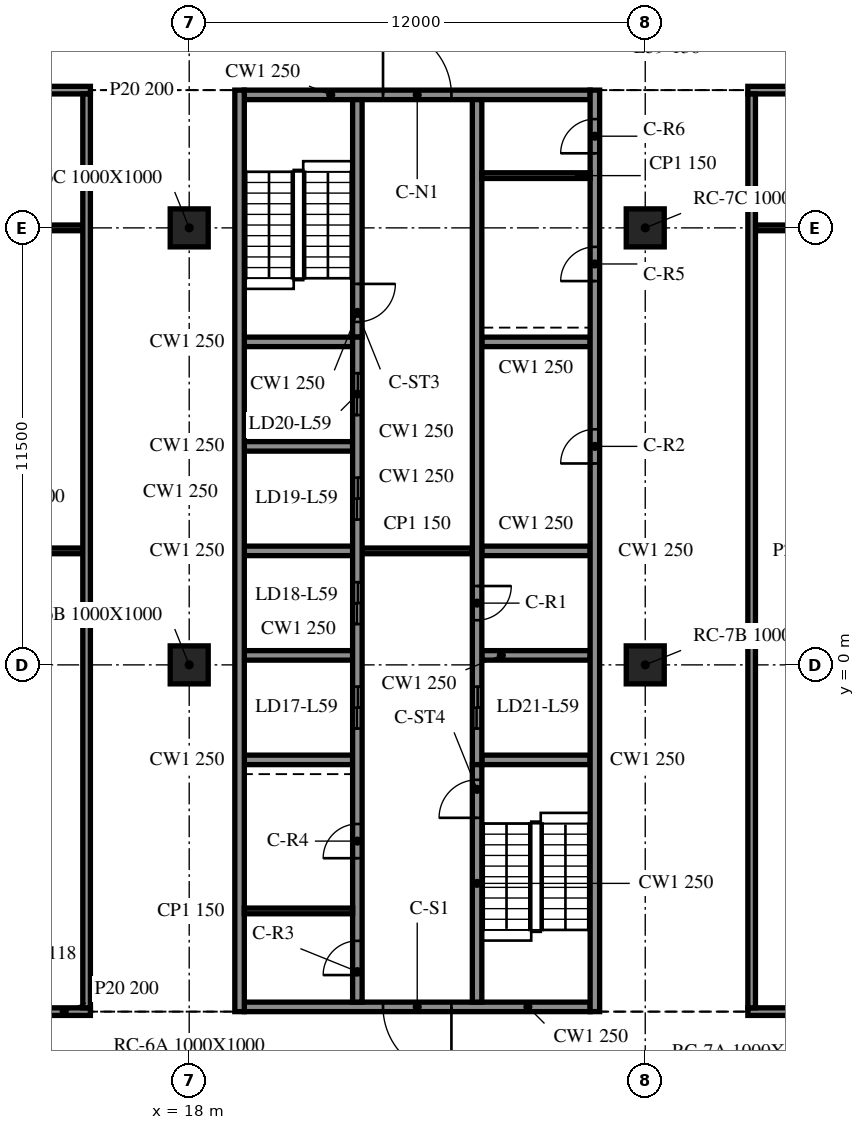
"""IFC4 building model, lengths in metres.
Left out: names, types, materials, properties, quantities, classifications, styles, units other than length and angle.
Written with IfcOpenShell. Run it as: python <this file> out.ifc"""

import sys

from ifc_helpers import new_model, si_unit, direction, frame, frame_2d, origin, origin_2d, place, context, subcontext, project, spatial, rectangle, extrude, element, fill, save


model = new_model("IFC4")
c1 = context("Model", 3, precision=1e-05, world=origin(), true_north=direction((0.0, 1.0)))
c2 = subcontext(c1, "Body", "Model", "MODEL_VIEW")
j1 = project(units=[si_unit("LENGTHUNIT", "METRE"), si_unit("PLANEANGLEUNIT", "RADIAN")], contexts=[c1])
p1 = place(None, origin())
s1 = spatial("IfcSite", under=j1, at=p1, CompositionType="ELEMENT")
p2 = place(p1, origin())
s2 = spatial("IfcBuilding", under=s1, at=p2, CompositionType="ELEMENT")
p3 = place(p2, frame((0.0, 0.0, 243.8)))
s3 = spatial("IfcBuildingStorey", under=s2, at=p3, CompositionType="ELEMENT", Elevation=243.8)
for number, where, z_axis, x_axis in (
    (1, (18.0, 0.0, -0.34), (0.0, 0.0, 1.0), (1.0, 0.0, 0.0)),
    (2, (18.0, 11.5, -0.34), (0.0, 0.0, 1.0), (1.0, 0.0, 0.0)),
    (3, (30.0, 0.0, -0.34), (0.0, 0.0, 1.0), (1.0, 0.0, 0.0)),
    (4, (30.0, 11.5, -0.34), (0.0, 0.0, 1.0), (1.0, 0.0, 0.0)),
):
    element("IfcColumn", number, at=place(p3, frame(where, z_axis=z_axis, x_axis=x_axis)), inside=s3, PredefinedType="COLUMN", context=c2, shape_type="SweptSolid", body=[
        extrude(rectangle(XDim=1.0, YDim=1.0, at=origin_2d()), origin(), (0.0, 0.0, 1.0), 3.8),
    ])
p4 = place(p3, frame((19.325, 15.125, 0.0), z_axis=(0.0, 0.0, 1.0), x_axis=(0.0, -1.0, 0.0)))
e5 = element("IfcWall", 5, at=p4, inside=s3, PredefinedType="SOLIDWALL", context=c2, shape_type="SweptSolid", body=[
    extrude(rectangle(XDim=24.25, YDim=0.25, at=frame_2d((12.125, 0.0))), origin(), (0.0, 0.0, 1.0), 3.46),
])
p5 = place(p3, frame((28.675, -9.125, 0.0), z_axis=(0.0, 0.0, 1.0), x_axis=(0.0, 1.0, 0.0)))
e6 = element("IfcWall", 6, at=p5, inside=s3, PredefinedType="SOLIDWALL", context=c2, shape_type="SweptSolid", body=[
    extrude(rectangle(XDim=24.25, YDim=0.25, at=frame_2d((12.125, 0.0))), origin(), (0.0, 0.0, 1.0), 3.46),
])
p6 = place(p5, frame((14.425, 0.0, 0.0)))
e7 = element("IfcOpeningElement", 7, at=p6, cuts=e6, PredefinedType="OPENING", context=c2, shape_type="SweptSolid", body=[
    extrude(rectangle(XDim=0.9, YDim=2.1, at=frame_2d((0.45, 1.05))), frame((0.0, 0.135, 0.0), z_axis=(0.0, -1.0, 0.0), x_axis=(1.0, 0.0, 0.0)), (0.0, 0.0, 1.0), 0.27),
])
p7 = place(p5, frame((19.225, 0.0, 0.0)))
e8 = element("IfcOpeningElement", 8, at=p7, cuts=e6, PredefinedType="OPENING", context=c2, shape_type="SweptSolid", body=[
    extrude(rectangle(XDim=0.9, YDim=2.1, at=frame_2d((0.45, 1.05))), frame((0.0, 0.135, 0.0), z_axis=(0.0, -1.0, 0.0), x_axis=(1.0, 0.0, 0.0)), (0.0, 0.0, 1.0), 0.27),
])
p8 = place(p5, frame((22.587, 0.0, 0.0)))
e9 = element("IfcOpeningElement", 9, at=p8, cuts=e6, PredefinedType="OPENING", context=c2, shape_type="SweptSolid", body=[
    extrude(rectangle(XDim=0.9, YDim=2.1, at=frame_2d((0.45, 1.05))), frame((0.0, 0.135, 0.0), z_axis=(0.0, -1.0, 0.0), x_axis=(1.0, 0.0, 0.0)), (0.0, 0.0, 1.0), 0.27),
])
p9 = place(p3, frame((28.55, -9.0, 0.0), z_axis=(0.0, 0.0, 1.0), x_axis=(-1.0, 0.0, 0.0)))
e10 = element("IfcWall", 10, at=p9, inside=s3, PredefinedType="SOLIDWALL", context=c2, shape_type="SweptSolid", body=[
    extrude(rectangle(XDim=9.1, YDim=0.25, at=frame_2d((4.55, 0.0))), origin(), (0.0, 0.0, 1.0), 3.46),
])
p10 = place(p9, frame((3.65, 0.0, 0.0)))
e11 = element("IfcOpeningElement", 11, at=p10, cuts=e10, PredefinedType="OPENING", context=c2, shape_type="SweptSolid", body=[
    extrude(rectangle(XDim=1.8, YDim=2.1, at=frame_2d((0.9, 1.05))), frame((0.0, 0.135, 0.0), z_axis=(0.0, -1.0, 0.0), x_axis=(1.0, 0.0, 0.0)), (0.0, 0.0, 1.0), 0.27),
])
p11 = place(p3, frame((19.45, 15.0, 0.0), z_axis=(0.0, 0.0, 1.0), x_axis=(1.0, 0.0, 0.0)))
e12 = element("IfcWall", 12, at=p11, inside=s3, PredefinedType="SOLIDWALL", context=c2, shape_type="SweptSolid", body=[
    extrude(rectangle(XDim=9.1, YDim=0.25, at=frame_2d((4.55, 0.0))), origin(), (0.0, 0.0, 1.0), 3.46),
])
p12 = place(p11, frame((3.65, 0.0, 0.0)))
e13 = element("IfcOpeningElement", 13, at=p12, cuts=e12, PredefinedType="OPENING", context=c2, shape_type="SweptSolid", body=[
    extrude(rectangle(XDim=1.8, YDim=2.1, at=frame_2d((0.9, 1.05))), frame((0.0, 0.135, 0.0), z_axis=(0.0, -1.0, 0.0), x_axis=(1.0, 0.0, 0.0)), (0.0, 0.0, 1.0), 0.27),
])
p13 = place(p3, frame((22.425, -8.875, 0.0), z_axis=(0.0, 0.0, 1.0), x_axis=(0.0, 1.0, 0.0)))
e14 = element("IfcWall", 14, at=p13, inside=s3, PredefinedType="SOLIDWALL", context=c2, shape_type="SweptSolid", body=[
    extrude(rectangle(XDim=17.5, YDim=0.25, at=frame_2d((8.75, 0.0))), origin(), (0.0, 0.0, 1.0), 3.46),
])
p14 = place(p13, frame((7.2, 0.0, 0.0)))
e15 = element("IfcOpeningElement", 15, at=p14, cuts=e14, PredefinedType="OPENING", context=c2, shape_type="SweptSolid", body=[
    extrude(rectangle(XDim=1.1, YDim=2.1, at=frame_2d((0.55, 1.05))), frame((0.0, 0.135, 0.0), z_axis=(0.0, -1.0, 0.0), x_axis=(1.0, 0.0, 0.0)), (0.0, 0.0, 1.0), 0.27),
])
p15 = place(p13, frame((9.95, 0.0, 0.0)))
e16 = element("IfcOpeningElement", 16, at=p15, cuts=e14, PredefinedType="OPENING", context=c2, shape_type="SweptSolid", body=[
    extrude(rectangle(XDim=1.1, YDim=2.1, at=frame_2d((0.55, 1.05))), frame((0.0, 0.135, 0.0), z_axis=(0.0, -1.0, 0.0), x_axis=(1.0, 0.0, 0.0)), (0.0, 0.0, 1.0), 0.27),
])
p16 = place(p13, frame((12.7, 0.0, 0.0)))
e17 = element("IfcOpeningElement", 17, at=p16, cuts=e14, PredefinedType="OPENING", context=c2, shape_type="SweptSolid", body=[
    extrude(rectangle(XDim=1.1, YDim=2.1, at=frame_2d((0.55, 1.05))), frame((0.0, 0.135, 0.0), z_axis=(0.0, -1.0, 0.0), x_axis=(1.0, 0.0, 0.0)), (0.0, 0.0, 1.0), 0.27),
])
p17 = place(p13, frame((15.45, 0.0, 0.0)))
e18 = element("IfcOpeningElement", 18, at=p17, cuts=e14, PredefinedType="OPENING", context=c2, shape_type="SweptSolid", body=[
    extrude(rectangle(XDim=1.1, YDim=2.1, at=frame_2d((0.55, 1.05))), frame((0.0, 0.135, 0.0), z_axis=(0.0, -1.0, 0.0), x_axis=(1.0, 0.0, 0.0)), (0.0, 0.0, 1.0), 0.27),
])
p18 = place(p13, frame((0.712, 0.0, 0.0)))
e19 = element("IfcOpeningElement", 19, at=p18, cuts=e14, PredefinedType="OPENING", context=c2, shape_type="SweptSolid", body=[
    extrude(rectangle(XDim=0.9, YDim=2.1, at=frame_2d((0.45, 1.05))), frame((0.0, 0.135, 0.0), z_axis=(0.0, -1.0, 0.0), x_axis=(1.0, 0.0, 0.0)), (0.0, 0.0, 1.0), 0.27),
])
p19 = place(p13, frame((3.788, 0.0, 0.0)))
e20 = element("IfcOpeningElement", 20, at=p19, cuts=e14, PredefinedType="OPENING", context=c2, shape_type="SweptSolid", body=[
    extrude(rectangle(XDim=0.9, YDim=2.1, at=frame_2d((0.45, 1.05))), frame((0.0, 0.135, 0.0), z_axis=(0.0, -1.0, 0.0), x_axis=(1.0, 0.0, 0.0)), (0.0, 0.0, 1.0), 0.27),
])
p20 = place(p3, frame((22.425, 14.875, 0.0), z_axis=(0.0, 0.0, 1.0), x_axis=(0.0, -1.0, 0.0)))
e21 = element("IfcWall", 21, at=p20, inside=s3, PredefinedType="SOLIDWALL", context=c2, shape_type="SweptSolid", body=[
    extrude(rectangle(XDim=6.25, YDim=0.25, at=frame_2d((3.125, 0.0))), origin(), (0.0, 0.0, 1.0), 3.46),
])
p21 = place(p20, frame((4.85, 0.0, 0.0)))
e22 = element("IfcOpeningElement", 22, at=p21, cuts=e21, PredefinedType="OPENING", context=c2, shape_type="SweptSolid", body=[
    extrude(rectangle(XDim=1.0, YDim=2.1, at=frame_2d((0.5, 1.05))), frame((0.0, 0.135, 0.0), z_axis=(0.0, -1.0, 0.0), x_axis=(1.0, 0.0, 0.0)), (0.0, 0.0, 1.0), 0.27),
])
p22 = place(p3, frame((25.575, -8.875, 0.0), z_axis=(0.0, 0.0, 1.0), x_axis=(0.0, 1.0, 0.0)))
e23 = element("IfcWall", 23, at=p22, inside=s3, PredefinedType="SOLIDWALL", context=c2, shape_type="SweptSolid", body=[
    extrude(rectangle(XDim=6.25, YDim=0.25, at=frame_2d((3.125, 0.0))), origin(), (0.0, 0.0, 1.0), 3.46),
])
p23 = place(p22, frame((4.85, 0.0, 0.0)))
e24 = element("IfcOpeningElement", 24, at=p23, cuts=e23, PredefinedType="OPENING", context=c2, shape_type="SweptSolid", body=[
    extrude(rectangle(XDim=1.0, YDim=2.1, at=frame_2d((0.5, 1.05))), frame((0.0, 0.135, 0.0), z_axis=(0.0, -1.0, 0.0), x_axis=(1.0, 0.0, 0.0)), (0.0, 0.0, 1.0), 0.27),
])
p24 = place(p3, frame((25.575, 14.875, 0.0), z_axis=(0.0, 0.0, 1.0), x_axis=(0.0, -1.0, 0.0)))
e25 = element("IfcWall", 25, at=p24, inside=s3, PredefinedType="SOLIDWALL", context=c2, shape_type="SweptSolid", body=[
    extrude(rectangle(XDim=17.5, YDim=0.25, at=frame_2d((8.75, 0.0))), origin(), (0.0, 0.0, 1.0), 3.46),
])
p25 = place(p24, frame((15.45, 0.0, 0.0)))
e26 = element("IfcOpeningElement", 26, at=p25, cuts=e25, PredefinedType="OPENING", context=c2, shape_type="SweptSolid", body=[
    extrude(rectangle(XDim=1.1, YDim=2.1, at=frame_2d((0.55, 1.05))), frame((0.0, 0.135, 0.0), z_axis=(0.0, -1.0, 0.0), x_axis=(1.0, 0.0, 0.0)), (0.0, 0.0, 1.0), 0.27),
])
p26 = place(p24, frame((12.8, 0.0, 0.0)))
e27 = element("IfcOpeningElement", 27, at=p26, cuts=e25, PredefinedType="OPENING", context=c2, shape_type="SweptSolid", body=[
    extrude(rectangle(XDim=0.9, YDim=2.1, at=frame_2d((0.45, 1.05))), frame((0.0, 0.135, 0.0), z_axis=(0.0, -1.0, 0.0), x_axis=(1.0, 0.0, 0.0)), (0.0, 0.0, 1.0), 0.27),
])
for number, where, z_axis, x_axis in (
    (28, (19.45, -2.5, 0.0), (0.0, 0.0, 1.0), (1.0, 0.0, 0.0)),
    (29, (19.45, 0.25, 0.0), (0.0, 0.0, 1.0), (1.0, 0.0, 0.0)),
    (30, (19.45, 3.0, 0.0), (0.0, 0.0, 1.0), (1.0, 0.0, 0.0)),
    (31, (19.45, 5.75, 0.0), (0.0, 0.0, 1.0), (1.0, 0.0, 0.0)),
    (32, (19.45, 8.5, 0.0), (0.0, 0.0, 1.0), (1.0, 0.0, 0.0)),
    (33, (25.7, -2.5, 0.0), (0.0, 0.0, 1.0), (1.0, 0.0, 0.0)),
    (34, (25.7, 0.25, 0.0), (0.0, 0.0, 1.0), (1.0, 0.0, 0.0)),
    (35, (25.7, 3.0, 0.0), (0.0, 0.0, 1.0), (1.0, 0.0, 0.0)),
    (36, (25.7, 8.5, 0.0), (0.0, 0.0, 1.0), (1.0, 0.0, 0.0)),
):
    element("IfcWall", number, at=place(p3, frame(where, z_axis=z_axis, x_axis=x_axis)), inside=s3, PredefinedType="SOLIDWALL", context=c2, shape_type="SweptSolid", body=[
        extrude(rectangle(XDim=2.85, YDim=0.25, at=frame_2d((1.425, 0.0))), origin(), (0.0, 0.0, 1.0), 3.46),
    ])
p27 = place(p3, frame((22.55, 3.0, 0.0), z_axis=(0.0, 0.0, 1.0), x_axis=(1.0, 0.0, 0.0)))
e37 = element("IfcWall", 37, at=p27, inside=s3, PredefinedType="PARTITIONING", context=c2, shape_type="SweptSolid", body=[
    extrude(rectangle(XDim=2.9, YDim=0.15, at=frame_2d((1.45, 0.0))), origin(), (0.0, 0.0, 1.0), 3.46),
])
for number, where, z_axis, x_axis in (
    (38, (19.45, -6.475, 0.0), (0.0, 0.0, 1.0), (1.0, 0.0, 0.0)),
    (39, (25.7, 12.875, 0.0), (0.0, 0.0, 1.0), (1.0, 0.0, 0.0)),
):
    element("IfcWall", number, at=place(p3, frame(where, z_axis=z_axis, x_axis=x_axis)), inside=s3, PredefinedType="PARTITIONING", context=c2, shape_type="SweptSolid", body=[
        extrude(rectangle(XDim=2.85, YDim=0.15, at=frame_2d((1.425, 0.0))), origin(), (0.0, 0.0, 1.0), 3.46),
    ])
p28 = place(p3, frame((8.5, -9.125, 0.0), z_axis=(0.0, 0.0, 1.0), x_axis=(1.0, 0.0, 0.0)))
e40 = element("IfcWall", 40, at=p28, inside=s3, PredefinedType="PARTITIONING", context=c2, shape_type="SweptSolid", body=[
    extrude(rectangle(XDim=6.9, YDim=0.2, at=frame_2d((3.45, 0.0))), origin(), (0.0, 0.0, 1.0), 3.46),
])
p29 = place(p28, frame((2.9, 0.0, 0.0)))
e41 = element("IfcOpeningElement", 41, at=p29, cuts=e40, PredefinedType="OPENING", context=c2, shape_type="SweptSolid", body=[
    extrude(rectangle(XDim=1.0, YDim=2.1, at=frame_2d((0.5, 1.05))), frame((0.0, 0.11, 0.0), z_axis=(0.0, -1.0, 0.0), x_axis=(1.0, 0.0, 0.0)), (0.0, 0.0, 1.0), 0.22),
])
p30 = place(p3, frame((32.7, -9.125, 0.0), z_axis=(0.0, 0.0, 1.0), x_axis=(1.0, 0.0, 0.0)))
e42 = element("IfcWall", 42, at=p30, inside=s3, PredefinedType="PARTITIONING", context=c2, shape_type="SweptSolid", body=[
    extrude(rectangle(XDim=21.275, YDim=0.2, at=frame_2d((10.638, 0.0))), origin(), (0.0, 0.0, 1.0), 3.46),
])
p31 = place(p30, frame((10.1, 0.0, 0.0)))
e43 = element("IfcOpeningElement", 43, at=p31, cuts=e42, PredefinedType="OPENING", context=c2, shape_type="SweptSolid", body=[
    extrude(rectangle(XDim=1.0, YDim=2.1, at=frame_2d((0.5, 1.05))), frame((0.0, 0.11, 0.0), z_axis=(0.0, -1.0, 0.0), x_axis=(1.0, 0.0, 0.0)), (0.0, 0.0, 1.0), 0.22),
])
for number, where, z_axis, x_axis in (
    (44, (8.7, 3.0, 0.0), (0.0, 0.0, 1.0), (1.0, 0.0, 0.0)),
    (45, (8.7, 11.5, 0.0), (0.0, 0.0, 1.0), (1.0, 0.0, 0.0)),
):
    element("IfcWall", number, at=place(p3, frame(where, z_axis=z_axis, x_axis=x_axis)), inside=s3, PredefinedType="PARTITIONING", context=c2, shape_type="SweptSolid", body=[
        extrude(rectangle(XDim=6.5, YDim=0.15, at=frame_2d((3.25, 0.0))), origin(), (0.0, 0.0, 1.0), 3.46),
    ])
p32 = place(p3, frame((32.9, 11.5, 0.0), z_axis=(0.0, 0.0, 1.0), x_axis=(1.0, 0.0, 0.0)))
e46 = element("IfcWall", 46, at=p32, inside=s3, PredefinedType="PARTITIONING", context=c2, shape_type="SweptSolid", body=[
    extrude(rectangle(XDim=8.6, YDim=0.15, at=frame_2d((4.3, 0.0))), origin(), (0.0, 0.0, 1.0), 3.46),
])
p33 = place(p3, frame((8.5, 15.125, 0.0), z_axis=(0.0, 0.0, 1.0), x_axis=(1.0, 0.0, 0.0)))
e47 = element("IfcWall", 47, at=p33, inside=s3, PredefinedType="PARTITIONING", context=c2, shape_type="SweptSolid", body=[
    extrude(rectangle(XDim=6.9, YDim=0.2, at=frame_2d((3.45, 0.0))), origin(), (0.0, 0.0, 1.0), 3.46),
])
p34 = place(p33, frame((2.9, 0.0, 0.0)))
e48 = element("IfcOpeningElement", 48, at=p34, cuts=e47, PredefinedType="OPENING", context=c2, shape_type="SweptSolid", body=[
    extrude(rectangle(XDim=1.0, YDim=2.1, at=frame_2d((0.5, 1.05))), frame((0.0, 0.11, 0.0), z_axis=(0.0, -1.0, 0.0), x_axis=(1.0, 0.0, 0.0)), (0.0, 0.0, 1.0), 0.22),
])
p35 = place(p3, frame((32.7, 15.125, 0.0), z_axis=(0.0, 0.0, 1.0), x_axis=(1.0, 0.0, 0.0)))
e49 = element("IfcWall", 49, at=p35, inside=s3, PredefinedType="PARTITIONING", context=c2, shape_type="SweptSolid", body=[
    extrude(rectangle(XDim=21.275, YDim=0.2, at=frame_2d((10.638, 0.0))), origin(), (0.0, 0.0, 1.0), 3.46),
])
p36 = place(p35, frame((10.1, 0.0, 0.0)))
e50 = element("IfcOpeningElement", 50, at=p36, cuts=e49, PredefinedType="OPENING", context=c2, shape_type="SweptSolid", body=[
    extrude(rectangle(XDim=1.0, YDim=2.1, at=frame_2d((0.5, 1.05))), frame((0.0, 0.11, 0.0), z_axis=(0.0, -1.0, 0.0), x_axis=(1.0, 0.0, 0.0)), (0.0, 0.0, 1.0), 0.22),
])
for number, where, z_axis, x_axis in (
    (51, (15.3, -9.025, 0.0), (0.0, 0.0, 1.0), (0.0, 1.0, 0.0)),
    (52, (32.8, -9.025, 0.0), (0.0, 0.0, 1.0), (0.0, 1.0, 0.0)),
):
    element("IfcWall", number, at=place(p3, frame(where, z_axis=z_axis, x_axis=x_axis)), inside=s3, PredefinedType="PARTITIONING", context=c2, shape_type="SweptSolid", body=[
        extrude(rectangle(XDim=24.05, YDim=0.2, at=frame_2d((12.025, 0.0))), origin(), (0.0, 0.0, 1.0), 3.46),
    ])
p37 = place(p10, origin())
e53 = element("IfcDoor", 53, at=p37, inside=s3, OperationType="DOUBLE_DOOR_SINGLE_SWING", PredefinedType="DOOR", context=c2, shape_type="SweptSolid", body=[
    extrude(rectangle(XDim=1.8, YDim=2.1, at=frame_2d((0.9, 1.05))), frame((0.0, 0.025, 0.0), z_axis=(0.0, -1.0, 0.0), x_axis=(1.0, 0.0, 0.0)), (0.0, 0.0, 1.0), 0.05),
])
fill(e11, e53)
p38 = place(p12, origin())
e54 = element("IfcDoor", 54, at=p38, inside=s3, OperationType="DOUBLE_DOOR_SINGLE_SWING", PredefinedType="DOOR", context=c2, shape_type="SweptSolid", body=[
    extrude(rectangle(XDim=1.8, YDim=2.1, at=frame_2d((0.9, 1.05))), frame((0.0, 0.025, 0.0), z_axis=(0.0, -1.0, 0.0), x_axis=(1.0, 0.0, 0.0)), (0.0, 0.0, 1.0), 0.05),
])
fill(e13, e54)
p39 = place(p25, origin())
e55 = element("IfcDoor", 55, at=p39, inside=s3, OperationType="DOUBLE_DOOR_SLIDING", PredefinedType="DOOR", context=c2, shape_type="SweptSolid", body=[
    extrude(rectangle(XDim=1.1, YDim=2.1, at=frame_2d((0.55, 1.05))), frame((0.0, 0.025, 0.0), z_axis=(0.0, -1.0, 0.0), x_axis=(1.0, 0.0, 0.0)), (0.0, 0.0, 1.0), 0.05),
])
fill(e26, e55)
p40 = place(p14, origin())
e56 = element("IfcDoor", 56, at=p40, inside=s3, OperationType="DOUBLE_DOOR_SLIDING", PredefinedType="DOOR", context=c2, shape_type="SweptSolid", body=[
    extrude(rectangle(XDim=1.1, YDim=2.1, at=frame_2d((0.55, 1.05))), frame((0.0, 0.025, 0.0), z_axis=(0.0, -1.0, 0.0), x_axis=(1.0, 0.0, 0.0)), (0.0, 0.0, 1.0), 0.05),
])
fill(e15, e56)
p41 = place(p15, origin())
e57 = element("IfcDoor", 57, at=p41, inside=s3, OperationType="DOUBLE_DOOR_SLIDING", PredefinedType="DOOR", context=c2, shape_type="SweptSolid", body=[
    extrude(rectangle(XDim=1.1, YDim=2.1, at=frame_2d((0.55, 1.05))), frame((0.0, 0.025, 0.0), z_axis=(0.0, -1.0, 0.0), x_axis=(1.0, 0.0, 0.0)), (0.0, 0.0, 1.0), 0.05),
])
fill(e16, e57)
p42 = place(p16, origin())
e58 = element("IfcDoor", 58, at=p42, inside=s3, OperationType="DOUBLE_DOOR_SLIDING", PredefinedType="DOOR", context=c2, shape_type="SweptSolid", body=[
    extrude(rectangle(XDim=1.1, YDim=2.1, at=frame_2d((0.55, 1.05))), frame((0.0, 0.025, 0.0), z_axis=(0.0, -1.0, 0.0), x_axis=(1.0, 0.0, 0.0)), (0.0, 0.0, 1.0), 0.05),
])
fill(e17, e58)
p43 = place(p17, origin())
e59 = element("IfcDoor", 59, at=p43, inside=s3, OperationType="DOUBLE_DOOR_SLIDING", PredefinedType="DOOR", context=c2, shape_type="SweptSolid", body=[
    extrude(rectangle(XDim=1.1, YDim=2.1, at=frame_2d((0.55, 1.05))), frame((0.0, 0.025, 0.0), z_axis=(0.0, -1.0, 0.0), x_axis=(1.0, 0.0, 0.0)), (0.0, 0.0, 1.0), 0.05),
])
fill(e18, e59)
p44 = place(p26, origin())
e60 = element("IfcDoor", 60, at=p44, inside=s3, OperationType="SINGLE_SWING_LEFT", PredefinedType="DOOR", context=c2, shape_type="SweptSolid", body=[
    extrude(rectangle(XDim=0.9, YDim=2.1, at=frame_2d((0.45, 1.05))), frame((0.0, 0.025, 0.0), z_axis=(0.0, -1.0, 0.0), x_axis=(1.0, 0.0, 0.0)), (0.0, 0.0, 1.0), 0.05),
])
fill(e27, e60)
p45 = place(p6, origin())
e61 = element("IfcDoor", 61, at=p45, inside=s3, OperationType="SINGLE_SWING_RIGHT", PredefinedType="DOOR", context=c2, shape_type="SweptSolid", body=[
    extrude(rectangle(XDim=0.9, YDim=2.1, at=frame_2d((0.45, 1.05))), frame((0.0, 0.025, 0.0), z_axis=(0.0, -1.0, 0.0), x_axis=(1.0, 0.0, 0.0)), (0.0, 0.0, 1.0), 0.05),
])
fill(e7, e61)
p46 = place(p18, origin())
e62 = element("IfcDoor", 62, at=p46, inside=s3, OperationType="SINGLE_SWING_LEFT", PredefinedType="DOOR", context=c2, shape_type="SweptSolid", body=[
    extrude(rectangle(XDim=0.9, YDim=2.1, at=frame_2d((0.45, 1.05))), frame((0.0, 0.025, 0.0), z_axis=(0.0, -1.0, 0.0), x_axis=(1.0, 0.0, 0.0)), (0.0, 0.0, 1.0), 0.05),
])
fill(e19, e62)
p47 = place(p19, origin())
e63 = element("IfcDoor", 63, at=p47, inside=s3, OperationType="SINGLE_SWING_RIGHT", PredefinedType="DOOR", context=c2, shape_type="SweptSolid", body=[
    extrude(rectangle(XDim=0.9, YDim=2.1, at=frame_2d((0.45, 1.05))), frame((0.0, 0.025, 0.0), z_axis=(0.0, -1.0, 0.0), x_axis=(1.0, 0.0, 0.0)), (0.0, 0.0, 1.0), 0.05),
])
fill(e20, e63)
p48 = place(p7, origin())
e64 = element("IfcDoor", 64, at=p48, inside=s3, OperationType="SINGLE_SWING_LEFT", PredefinedType="DOOR", context=c2, shape_type="SweptSolid", body=[
    extrude(rectangle(XDim=0.9, YDim=2.1, at=frame_2d((0.45, 1.05))), frame((0.0, 0.025, 0.0), z_axis=(0.0, -1.0, 0.0), x_axis=(1.0, 0.0, 0.0)), (0.0, 0.0, 1.0), 0.05),
])
fill(e8, e64)
p49 = place(p8, origin())
e65 = element("IfcDoor", 65, at=p49, inside=s3, OperationType="SINGLE_SWING_RIGHT", PredefinedType="DOOR", context=c2, shape_type="SweptSolid", body=[
    extrude(rectangle(XDim=0.9, YDim=2.1, at=frame_2d((0.45, 1.05))), frame((0.0, 0.025, 0.0), z_axis=(0.0, -1.0, 0.0), x_axis=(1.0, 0.0, 0.0)), (0.0, 0.0, 1.0), 0.05),
])
fill(e9, e65)
p50 = place(p21, origin())
e66 = element("IfcDoor", 66, at=p50, inside=s3, OperationType="SINGLE_SWING_LEFT", PredefinedType="DOOR", context=c2, shape_type="SweptSolid", body=[
    extrude(rectangle(XDim=1.0, YDim=2.1, at=frame_2d((0.5, 1.05))), frame((0.0, 0.025, 0.0), z_axis=(0.0, -1.0, 0.0), x_axis=(1.0, 0.0, 0.0)), (0.0, 0.0, 1.0), 0.05),
])
fill(e22, e66)
p51 = place(p23, origin())
e67 = element("IfcDoor", 67, at=p51, inside=s3, OperationType="SINGLE_SWING_RIGHT", PredefinedType="DOOR", context=c2, shape_type="SweptSolid", body=[
    extrude(rectangle(XDim=1.0, YDim=2.1, at=frame_2d((0.5, 1.05))), frame((0.0, 0.025, 0.0), z_axis=(0.0, -1.0, 0.0), x_axis=(1.0, 0.0, 0.0)), (0.0, 0.0, 1.0), 0.05),
])
fill(e24, e67)
save(model, sys.argv[1])
